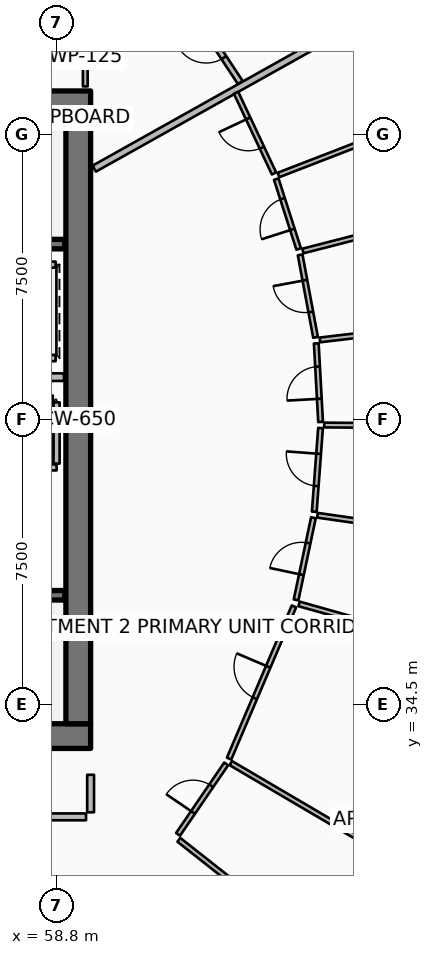
"""IFC4 building model, lengths in metres.
Left out: names, types, materials, properties, quantities, classifications, styles, units other than length and angle.
Written with IfcOpenShell. Run it as: python <this file> out.ifc"""

import sys

from ifc_helpers import new_model, si_unit, direction, frame, frame_2d, origin, place, context, subcontext, project, spatial, rectangle, extrude, element, fill, save


model = new_model("IFC4")
c1 = context("Model", 3, precision=1e-05, world=origin(), true_north=direction((0.0, 1.0)))
c2 = subcontext(c1, "Body", "Model", "MODEL_VIEW")
j1 = project(units=[si_unit("LENGTHUNIT", "METRE"), si_unit("PLANEANGLEUNIT", "RADIAN")], contexts=[c1])
p1 = place(None, origin())
s1 = spatial("IfcSite", under=j1, at=p1, CompositionType="ELEMENT")
p2 = place(p1, origin())
s2 = spatial("IfcBuilding", under=s1, at=p2, CompositionType="ELEMENT")
p3 = place(p2, frame((0.0, 0.0, 244.4)))
s3 = spatial("IfcBuildingStorey", under=s2, at=p3, CompositionType="ELEMENT", Elevation=244.4)
for number, where, z_axis, x_axis in (
    (1, (49.95, 33.675, 0.0), (0.0, 0.0, 1.0), (1.0, 0.0, 0.0)),
    (2, (49.95, 50.325, 0.0), (0.0, 0.0, 1.0), (1.0, 0.0, 0.0)),
):
    element("IfcWall", number, at=place(p3, frame(where, z_axis=z_axis, x_axis=x_axis)), inside=s3, PredefinedType="SHEAR", context=c2, shape_type="SweptSolid", body=[
        extrude(rectangle(XDim=9.75, YDim=0.65, at=frame_2d((4.875, 0.0))), origin(), (0.0, 0.0, 1.0), 3.85),
    ])
p4 = place(p3, frame((59.375, 34.0, 0.0), z_axis=(0.0, 0.0, 1.0), x_axis=(0.0, 1.0, 0.0)))
e3 = element("IfcWall", 3, at=p4, inside=s3, PredefinedType="SHEAR", context=c2, shape_type="SweptSolid", body=[
    extrude(rectangle(XDim=16.0, YDim=0.65, at=frame_2d((8.0, 0.0))), origin(), (0.0, 0.0, 1.0), 3.85),
])
p5 = place(p3, frame((51.48, 46.62, 0.0), z_axis=(0.0, 0.0, 1.0), x_axis=(1.0, 0.0, 0.0)))
e4 = element("IfcWall", 4, at=p5, inside=s3, PredefinedType="SOLIDWALL", context=c2, shape_type="SweptSolid", body=[
    extrude(rectangle(XDim=7.54, YDim=0.25, at=frame_2d((3.77, 0.0))), origin(), (0.0, 0.0, 1.0), 3.59),
])
p6 = place(p5, frame((0.3, 0.0, 0.0)))
e5 = element("IfcOpeningElement", 5, at=p6, cuts=e4, PredefinedType="OPENING", context=c2, shape_type="SweptSolid", body=[
    extrude(rectangle(XDim=1.55, YDim=2.15, at=frame_2d((0.775, 1.075))), frame((0.0, 0.135, 0.0), z_axis=(0.0, -1.0, 0.0), x_axis=(1.0, 0.0, 0.0)), (0.0, 0.0, 1.0), 0.27),
])
p7 = place(p3, frame((51.48, 37.38, 0.0), z_axis=(0.0, 0.0, 1.0), x_axis=(1.0, 0.0, 0.0)))
e6 = element("IfcWall", 6, at=p7, inside=s3, PredefinedType="SOLIDWALL", context=c2, shape_type="SweptSolid", body=[
    extrude(rectangle(XDim=7.54, YDim=0.25, at=frame_2d((3.77, 0.0))), origin(), (0.0, 0.0, 1.0), 3.59),
])
p8 = place(p7, frame((0.3, 0.0, 0.0)))
e7 = element("IfcOpeningElement", 7, at=p8, cuts=e6, PredefinedType="OPENING", context=c2, shape_type="SweptSolid", body=[
    extrude(rectangle(XDim=1.55, YDim=2.15, at=frame_2d((0.775, 1.075))), frame((0.0, 0.135, 0.0), z_axis=(0.0, -1.0, 0.0), x_axis=(1.0, 0.0, 0.0)), (0.0, 0.0, 1.0), 0.27),
])
p9 = place(p3, frame((58.805, 40.745, 0.0), z_axis=(0.0, 0.0, 1.0), x_axis=(-1.0, 0.0, 0.0)))
e8 = element("IfcWall", 8, at=p9, inside=s3, PredefinedType="PARTITIONING", context=c2, shape_type="SweptSolid", body=[
    extrude(rectangle(XDim=2.11, YDim=0.16, at=frame_2d((1.055, 0.0))), origin(), (0.0, 0.0, 1.0), 3.59),
])
p10 = place(p9, frame((0.505, 0.0, 0.0)))
e9 = element("IfcOpeningElement", 9, at=p10, cuts=e8, PredefinedType="OPENING", context=c2, shape_type="SweptSolid", body=[
    extrude(rectangle(XDim=1.1, YDim=2.1, at=frame_2d((0.55, 1.05))), frame((0.0, 0.09, 0.0), z_axis=(0.0, -1.0, 0.0), x_axis=(1.0, 0.0, 0.0)), (0.0, 0.0, 1.0), 0.18),
])
p11 = place(p3, frame((58.805, 40.845, 0.0), z_axis=(0.0, 0.0, 1.0), x_axis=(0.0, 1.0, 0.0)))
e10 = element("IfcWall", 10, at=p11, inside=s3, PredefinedType="PARTITIONING", context=c2, shape_type="SweptSolid", body=[
    extrude(rectangle(XDim=1.61, YDim=0.16, at=frame_2d((0.805, 0.0))), origin(), (0.0, 0.0, 1.0), 3.59),
])
p12 = place(p3, frame((56.795, 42.555, 0.0), z_axis=(0.0, 0.0, 1.0), x_axis=(1.0, 0.0, 0.0)))
e11 = element("IfcWall", 11, at=p12, inside=s3, PredefinedType="PARTITIONING", context=c2, shape_type="SweptSolid", body=[
    extrude(rectangle(XDim=1.91, YDim=0.16, at=frame_2d((0.955, 0.0))), origin(), (0.0, 0.0, 1.0), 3.59),
])
for number, where, z_axis, x_axis in (
    (12, (56.72, 46.08, 0.0), (0.0, 0.0, 1.0), (1.0, 0.0, 0.0)),
    (13, (56.72, 43.62, 0.0), (0.0, 0.0, 1.0), (1.0, 0.0, 0.0)),
):
    element("IfcWall", number, at=place(p3, frame(where, z_axis=z_axis, x_axis=x_axis)), inside=s3, PredefinedType="PARTITIONING", context=c2, shape_type="SweptSolid", body=[
        extrude(rectangle(XDim=2.06, YDim=0.16, at=frame_2d((1.03, 0.0))), origin(), (0.0, 0.0, 1.0), 3.59),
    ])
p13 = place(p3, frame((50.12, 43.12, 0.0), z_axis=(0.0, 0.0, 1.0), x_axis=(1.0, 0.0, 0.0)))
e14 = element("IfcWall", 14, at=p13, inside=s3, PredefinedType="PARTITIONING", context=c2, shape_type="SweptSolid", body=[
    extrude(rectangle(XDim=8.88, YDim=0.2, at=frame_2d((4.44, 0.0))), origin(), (0.0, 0.0, 1.0), 3.59),
])
p14 = place(p3, frame((59.56, 50.77, 0.0), z_axis=(0.0, 0.0, 1.0), x_axis=(0.0, 1.0, 0.0)))
e15 = element("IfcWall", 15, at=p14, inside=s3, PredefinedType="PARTITIONING", context=c2, shape_type="SweptSolid", body=[
    extrude(rectangle(XDim=1.54, YDim=0.125, at=frame_2d((0.77, 0.0))), origin(), (0.0, 0.0, 1.0), 3.03),
])
p15 = place(p3, frame((59.796, 48.606, 0.0), z_axis=(0.0, 0.0, 1.0), x_axis=(0.872493213488, 0.488626229767, 0.0)))
e16 = element("IfcWall", 16, at=p15, inside=s3, PredefinedType="PARTITIONING", context=c2, shape_type="SweptSolid", body=[
    extrude(rectangle(XDim=16.91, YDim=0.18, at=frame_2d((8.455, 0.0))), origin(), (0.0, 0.0, 1.0), 2.957),
])
p16 = place(p3, frame((63.639, 50.872, 0.0), z_axis=(0.0, 0.0, 1.0), x_axis=(-0.550539267926, 0.834809268319, 0.0)))
e17 = element("IfcWall", 17, at=p16, inside=s3, PredefinedType="PARTITIONING", context=c2, shape_type="SweptSolid", body=[
    extrude(rectangle(XDim=2.414, YDim=0.15, at=frame_2d((1.207, 0.0))), origin(), (0.0, 0.0, 1.0), 2.957),
])
p17 = place(p16, frame((0.782, 0.0, 0.0)))
e18 = element("IfcOpeningElement", 18, at=p17, cuts=e17, PredefinedType="OPENING", context=c2, shape_type="SweptSolid", body=[
    extrude(rectangle(XDim=0.85, YDim=2.06, at=frame_2d((0.425, 1.03))), frame((0.0, 0.085, 0.0), z_axis=(0.0, -1.0, 0.0), x_axis=(1.0, 0.0, 0.0)), (0.0, 0.0, 1.0), 0.17),
])
p18 = place(p3, frame((53.972, 31.55, 0.0), z_axis=(0.0, 0.0, 1.0), x_axis=(1.0, 0.0, 0.0)))
e19 = element("IfcWall", 19, at=p18, inside=s3, PredefinedType="PARTITIONING", context=c2, shape_type="SweptSolid", body=[
    extrude(rectangle(XDim=5.608, YDim=0.18, at=frame_2d((2.804, 0.0))), origin(), (0.0, 0.0, 1.0), 2.957),
])
p19 = place(p18, frame((2.254, 0.0, 0.0)))
e20 = element("IfcOpeningElement", 20, at=p19, cuts=e19, PredefinedType="OPENING", context=c2, shape_type="SweptSolid", body=[
    extrude(rectangle(XDim=1.1, YDim=2.1, at=frame_2d((0.55, 1.05))), frame((0.0, 0.1, 0.0), z_axis=(0.0, -1.0, 0.0), x_axis=(1.0, 0.0, 0.0)), (0.0, 0.0, 1.0), 0.2),
])
p20 = place(p3, frame((59.7, 31.67, 0.0), z_axis=(0.0, 0.0, 1.0), x_axis=(0.0, 1.0, 0.0)))
e21 = element("IfcWall", 21, at=p20, inside=s3, PredefinedType="PARTITIONING", context=c2, shape_type="SweptSolid", body=[
    extrude(rectangle(XDim=0.987, YDim=0.18, at=frame_2d((0.493, 0.0))), origin(), (0.0, 0.0, 1.0), 2.957),
])
p21 = place(p3, frame((62.023, 30.945, 0.0), z_axis=(0.0, 0.0, 1.0), x_axis=(0.785322102606, -0.619087388952, 0.0)))
e22 = element("IfcWall", 22, at=p21, inside=s3, PredefinedType="PARTITIONING", context=c2, shape_type="SweptSolid", body=[
    extrude(rectangle(XDim=9.228, YDim=0.125, at=frame_2d((4.614, 0.0))), origin(), (0.0, 0.0, 1.0), 2.957),
])
p22 = place(p3, frame((63.39, 32.963, 0.0), z_axis=(0.0, 0.0, 1.0), x_axis=(0.862331921897, -0.506343417532, 0.0)))
e23 = element("IfcWall", 23, at=p22, inside=s3, PredefinedType="PARTITIONING", context=c2, shape_type="SweptSolid", body=[
    extrude(rectangle(XDim=9.478, YDim=0.125, at=frame_2d((4.739, 0.0))), origin(), (0.0, 0.0, 1.0), 3.03),
])
p23 = place(p3, frame((62.001, 31.089, 0.0), z_axis=(0.0, 0.0, 1.0), x_axis=(0.564052095913, 0.825739204044, 0.0)))
e24 = element("IfcWall", 24, at=p23, inside=s3, PredefinedType="PARTITIONING", context=c2, shape_type="SweptSolid", body=[
    extrude(rectangle(XDim=2.245, YDim=0.125, at=frame_2d((1.122, 0.0))), origin(), (0.0, 0.0, 1.0), 2.957),
])
p24 = place(p23, frame((0.698, 0.0, 0.0)))
e25 = element("IfcOpeningElement", 25, at=p24, cuts=e24, PredefinedType="OPENING", context=c2, shape_type="SweptSolid", body=[
    extrude(rectangle(XDim=0.85, YDim=2.06, at=frame_2d((0.425, 1.03))), frame((0.0, 0.073, 0.0), z_axis=(0.0, -1.0, 0.0), x_axis=(1.0, 0.0, 0.0)), (0.0, 0.0, 1.0), 0.145),
])
p25 = place(p3, frame((63.344, 33.083, 0.0), z_axis=(0.0, 0.0, 1.0), x_axis=(0.392064212371, 0.919937852998, 0.0)))
e26 = element("IfcWall", 26, at=p25, inside=s3, PredefinedType="PARTITIONING", context=c2, shape_type="SweptSolid", body=[
    extrude(rectangle(XDim=4.354, YDim=0.125, at=frame_2d((2.177, 0.0))), origin(), (0.0, 0.0, 1.0), 2.957),
])
p26 = place(p25, frame((1.727, 0.0, 0.0)))
e27 = element("IfcOpeningElement", 27, at=p26, cuts=e26, PredefinedType="OPENING", context=c2, shape_type="SweptSolid", body=[
    extrude(rectangle(XDim=0.9, YDim=2.08, at=frame_2d((0.45, 1.04))), frame((0.0, 0.073, 0.0), z_axis=(0.0, -1.0, 0.0), x_axis=(1.0, 0.0, 0.0)), (0.0, 0.0, 1.0), 0.145),
])
p27 = place(p3, frame((65.187, 37.153, 0.0), z_axis=(0.0, 0.0, 1.0), x_axis=(0.962455577867, -0.271439239301, 0.0)))
e28 = element("IfcWall", 28, at=p27, inside=s3, PredefinedType="PARTITIONING", context=c2, shape_type="SweptSolid", body=[
    extrude(rectangle(XDim=11.639, YDim=0.125, at=frame_2d((5.819, 0.0))), origin(), (0.0, 0.0, 1.0), 2.957),
])
p28 = place(p3, frame((65.669, 39.485, 0.0), z_axis=(0.0, 0.0, 1.0), x_axis=(0.990022432034, -0.140909843761, 0.0)))
e29 = element("IfcWall", 29, at=p28, inside=s3, PredefinedType="PARTITIONING", context=c2, shape_type="SweptSolid", body=[
    extrude(rectangle(XDim=11.761, YDim=0.125, at=frame_2d((5.88, 0.0))), origin(), (0.0, 0.0, 1.0), 3.03),
])
p29 = place(p3, frame((65.846, 41.86, 0.0), z_axis=(0.0, 0.0, 1.0), x_axis=(0.999969162233, -0.007853316706, 0.0)))
e30 = element("IfcWall", 30, at=p29, inside=s3, PredefinedType="PARTITIONING", context=c2, shape_type="SweptSolid", body=[
    extrude(rectangle(XDim=12.311, YDim=0.125, at=frame_2d((6.155, 0.0))), origin(), (0.0, 0.0, 1.0), 3.03),
])
p30 = place(p3, frame((65.107, 37.258, 0.0), z_axis=(0.0, 0.0, 1.0), x_axis=(0.20677346991, 0.978388845062, 0.0)))
e31 = element("IfcWall", 31, at=p30, inside=s3, PredefinedType="PARTITIONING", context=c2, shape_type="SweptSolid", body=[
    extrude(rectangle(XDim=2.209, YDim=0.125, at=frame_2d((1.104, 0.0))), origin(), (0.0, 0.0, 1.0), 2.957),
])
p31 = place(p30, frame((0.68, 0.0, 0.0)))
e32 = element("IfcOpeningElement", 32, at=p31, cuts=e31, PredefinedType="OPENING", context=c2, shape_type="SweptSolid", body=[
    extrude(rectangle(XDim=0.85, YDim=2.06, at=frame_2d((0.425, 1.03))), frame((0.0, 0.073, 0.0), z_axis=(0.0, -1.0, 0.0), x_axis=(1.0, 0.0, 0.0)), (0.0, 0.0, 1.0), 0.145),
])
p32 = place(p3, frame((65.586, 39.578, 0.0), z_axis=(0.0, 0.0, 1.0), x_axis=(0.074490462528, 0.997221726093, 0.0)))
e33 = element("IfcWall", 33, at=p32, inside=s3, PredefinedType="PARTITIONING", context=c2, shape_type="SweptSolid", body=[
    extrude(rectangle(XDim=2.209, YDim=0.125, at=frame_2d((1.104, 0.0))), origin(), (0.0, 0.0, 1.0), 3.03),
])
p33 = place(p32, frame((0.679, 0.0, 0.0)))
e34 = element("IfcOpeningElement", 34, at=p33, cuts=e33, PredefinedType="OPENING", context=c2, shape_type="SweptSolid", body=[
    extrude(rectangle(XDim=0.85, YDim=2.06, at=frame_2d((0.425, 1.03))), frame((0.0, 0.073, 0.0), z_axis=(0.0, -1.0, 0.0), x_axis=(1.0, 0.0, 0.0)), (0.0, 0.0, 1.0), 0.145),
])
p34 = place(p3, frame((65.752, 41.94, 0.0), z_axis=(0.0, 0.0, 1.0), x_axis=(-0.055084577693, 0.998481692021, 0.0)))
e35 = element("IfcWall", 35, at=p34, inside=s3, PredefinedType="PARTITIONING", context=c2, shape_type="SweptSolid", body=[
    extrude(rectangle(XDim=2.07, YDim=0.125, at=frame_2d((1.035, 0.0))), origin(), (0.0, 0.0, 1.0), 2.957),
])
p35 = place(p34, frame((0.61, 0.0, 0.0)))
e36 = element("IfcOpeningElement", 36, at=p35, cuts=e35, PredefinedType="OPENING", context=c2, shape_type="SweptSolid", body=[
    extrude(rectangle(XDim=0.85, YDim=2.06, at=frame_2d((0.425, 1.03))), frame((0.0, 0.073, 0.0), z_axis=(0.0, -1.0, 0.0), x_axis=(1.0, 0.0, 0.0)), (0.0, 0.0, 1.0), 0.145),
])
p36 = place(p3, frame((65.733, 44.099, 0.0), z_axis=(0.0, 0.0, 1.0), x_axis=(0.99306831242, 0.117538618625, 0.0)))
e37 = element("IfcWall", 37, at=p36, inside=s3, PredefinedType="PARTITIONING", context=c2, shape_type="SweptSolid", body=[
    extrude(rectangle(XDim=12.573, YDim=0.125, at=frame_2d((6.286, 0.0))), origin(), (0.0, 0.0, 1.0), 2.957),
])
p37 = place(p3, frame((65.286, 46.438, 0.0), z_axis=(0.0, 0.0, 1.0), x_axis=(0.968583991447, 0.248686653265, 0.0)))
e38 = element("IfcWall", 38, at=p37, inside=s3, PredefinedType="PARTITIONING", context=c2, shape_type="SweptSolid", body=[
    extrude(rectangle(XDim=12.056, YDim=0.125, at=frame_2d((6.028, 0.0))), origin(), (0.0, 0.0, 1.0), 3.03),
])
p38 = place(p3, frame((64.645, 48.439, 0.0), z_axis=(0.0, 0.0, 1.0), x_axis=(0.93263897003, 0.360810963778, 0.0)))
e39 = element("IfcWall", 39, at=p38, inside=s3, PredefinedType="PARTITIONING", context=c2, shape_type="SweptSolid", body=[
    extrude(rectangle(XDim=12.043, YDim=0.125, at=frame_2d((6.021, 0.0))), origin(), (0.0, 0.0, 1.0), 3.03),
])
p39 = place(p3, frame((65.619, 44.166, 0.0), z_axis=(0.0, 0.0, 1.0), x_axis=(-0.183454395516, 0.983028221755, 0.0)))
e40 = element("IfcWall", 40, at=p39, inside=s3, PredefinedType="PARTITIONING", context=c2, shape_type="SweptSolid", body=[
    extrude(rectangle(XDim=2.209, YDim=0.125, at=frame_2d((1.104, 0.0))), origin(), (0.0, 0.0, 1.0), 2.957),
])
p40 = place(p39, frame((0.68, 0.0, 0.0)))
e41 = element("IfcOpeningElement", 41, at=p40, cuts=e40, PredefinedType="OPENING", context=c2, shape_type="SweptSolid", body=[
    extrude(rectangle(XDim=0.85, YDim=2.06, at=frame_2d((0.425, 1.03))), frame((0.0, 0.073, 0.0), z_axis=(0.0, -1.0, 0.0), x_axis=(1.0, 0.0, 0.0)), (0.0, 0.0, 1.0), 0.145),
])
p41 = place(p3, frame((65.175, 46.492, 0.0), z_axis=(0.0, 0.0, 1.0), x_axis=(-0.305358332679, 0.952237516938, 0.0)))
e42 = element("IfcWall", 42, at=p41, inside=s3, PredefinedType="PARTITIONING", context=c2, shape_type="SweptSolid", body=[
    extrude(rectangle(XDim=1.931, YDim=0.125, at=frame_2d((0.965, 0.0))), origin(), (0.0, 0.0, 1.0), 3.03),
])
p42 = place(p41, frame((0.54, 0.0, 0.0)))
e43 = element("IfcOpeningElement", 43, at=p42, cuts=e42, PredefinedType="OPENING", context=c2, shape_type="SweptSolid", body=[
    extrude(rectangle(XDim=0.85, YDim=2.06, at=frame_2d((0.425, 1.03))), frame((0.0, 0.073, 0.0), z_axis=(0.0, -1.0, 0.0), x_axis=(1.0, 0.0, 0.0)), (0.0, 0.0, 1.0), 0.145),
])
p43 = place(p3, frame((64.527, 48.479, 0.0), z_axis=(0.0, 0.0, 1.0), x_axis=(-0.425751972865, 0.904839907167, 0.0)))
e44 = element("IfcWall", 44, at=p43, inside=s3, PredefinedType="PARTITIONING", context=c2, shape_type="SweptSolid", body=[
    extrude(rectangle(XDim=2.348, YDim=0.125, at=frame_2d((1.174, 0.0))), origin(), (0.0, 0.0, 1.0), 2.957),
])
p44 = place(p43, frame((0.749, 0.0, 0.0)))
e45 = element("IfcOpeningElement", 45, at=p44, cuts=e44, PredefinedType="OPENING", context=c2, shape_type="SweptSolid", body=[
    extrude(rectangle(XDim=0.85, YDim=2.06, at=frame_2d((0.425, 1.03))), frame((0.0, 0.073, 0.0), z_axis=(0.0, -1.0, 0.0), x_axis=(1.0, 0.0, 0.0)), (0.0, 0.0, 1.0), 0.145),
])
p45 = place(p17, origin())
e46 = element("IfcDoor", 46, at=p45, inside=s3, OperationType="SINGLE_SWING_RIGHT", PredefinedType="DOOR", context=c2, shape_type="SweptSolid", body=[
    extrude(rectangle(XDim=0.85, YDim=2.06, at=frame_2d((0.425, 1.03))), frame((0.0, 0.025, 0.0), z_axis=(0.0, -1.0, 0.0), x_axis=(1.0, 0.0, 0.0)), (0.0, 0.0, 1.0), 0.05),
])
fill(e18, e46)
p46 = place(p24, origin())
e47 = element("IfcDoor", 47, at=p46, inside=s3, OperationType="SINGLE_SWING_LEFT", PredefinedType="DOOR", context=c2, shape_type="SweptSolid", body=[
    extrude(rectangle(XDim=0.85, YDim=2.06, at=frame_2d((0.425, 1.03))), frame((0.0, 0.025, 0.0), z_axis=(0.0, -1.0, 0.0), x_axis=(1.0, 0.0, 0.0)), (0.0, 0.0, 1.0), 0.05),
])
fill(e25, e47)
p47 = place(p26, origin())
e48 = element("IfcDoor", 48, at=p47, inside=s3, OperationType="SINGLE_SWING_RIGHT", PredefinedType="DOOR", context=c2, shape_type="SweptSolid", body=[
    extrude(rectangle(XDim=0.9, YDim=2.08, at=frame_2d((0.45, 1.04))), frame((0.0, 0.025, 0.0), z_axis=(0.0, -1.0, 0.0), x_axis=(1.0, 0.0, 0.0)), (0.0, 0.0, 1.0), 0.05),
])
fill(e27, e48)
p48 = place(p31, origin())
e49 = element("IfcDoor", 49, at=p48, inside=s3, OperationType="SINGLE_SWING_LEFT", PredefinedType="DOOR", context=c2, shape_type="SweptSolid", body=[
    extrude(rectangle(XDim=0.85, YDim=2.06, at=frame_2d((0.425, 1.03))), frame((0.0, 0.025, 0.0), z_axis=(0.0, -1.0, 0.0), x_axis=(1.0, 0.0, 0.0)), (0.0, 0.0, 1.0), 0.05),
])
fill(e32, e49)
p49 = place(p33, origin())
e50 = element("IfcDoor", 50, at=p49, inside=s3, OperationType="SINGLE_SWING_RIGHT", PredefinedType="DOOR", context=c2, shape_type="SweptSolid", body=[
    extrude(rectangle(XDim=0.85, YDim=2.06, at=frame_2d((0.425, 1.03))), frame((0.0, 0.025, 0.0), z_axis=(0.0, -1.0, 0.0), x_axis=(1.0, 0.0, 0.0)), (0.0, 0.0, 1.0), 0.05),
])
fill(e34, e50)
p50 = place(p35, origin())
e51 = element("IfcDoor", 51, at=p50, inside=s3, OperationType="SINGLE_SWING_LEFT", PredefinedType="DOOR", context=c2, shape_type="SweptSolid", body=[
    extrude(rectangle(XDim=0.85, YDim=2.06, at=frame_2d((0.425, 1.03))), frame((0.0, 0.025, 0.0), z_axis=(0.0, -1.0, 0.0), x_axis=(1.0, 0.0, 0.0)), (0.0, 0.0, 1.0), 0.05),
])
fill(e36, e51)
p51 = place(p40, origin())
e52 = element("IfcDoor", 52, at=p51, inside=s3, OperationType="SINGLE_SWING_RIGHT", PredefinedType="DOOR", context=c2, shape_type="SweptSolid", body=[
    extrude(rectangle(XDim=0.85, YDim=2.06, at=frame_2d((0.425, 1.03))), frame((0.0, 0.025, 0.0), z_axis=(0.0, -1.0, 0.0), x_axis=(1.0, 0.0, 0.0)), (0.0, 0.0, 1.0), 0.05),
])
fill(e41, e52)
p52 = place(p42, origin())
e53 = element("IfcDoor", 53, at=p52, inside=s3, OperationType="SINGLE_SWING_LEFT", PredefinedType="DOOR", context=c2, shape_type="SweptSolid", body=[
    extrude(rectangle(XDim=0.85, YDim=2.06, at=frame_2d((0.425, 1.03))), frame((0.0, 0.025, 0.0), z_axis=(0.0, -1.0, 0.0), x_axis=(1.0, 0.0, 0.0)), (0.0, 0.0, 1.0), 0.05),
])
fill(e43, e53)
p53 = place(p44, origin())
e54 = element("IfcDoor", 54, at=p53, inside=s3, OperationType="SINGLE_SWING_RIGHT", PredefinedType="DOOR", context=c2, shape_type="SweptSolid", body=[
    extrude(rectangle(XDim=0.85, YDim=2.06, at=frame_2d((0.425, 1.03))), frame((0.0, 0.025, 0.0), z_axis=(0.0, -1.0, 0.0), x_axis=(1.0, 0.0, 0.0)), (0.0, 0.0, 1.0), 0.05),
])
fill(e45, e54)
save(model, sys.argv[1])
